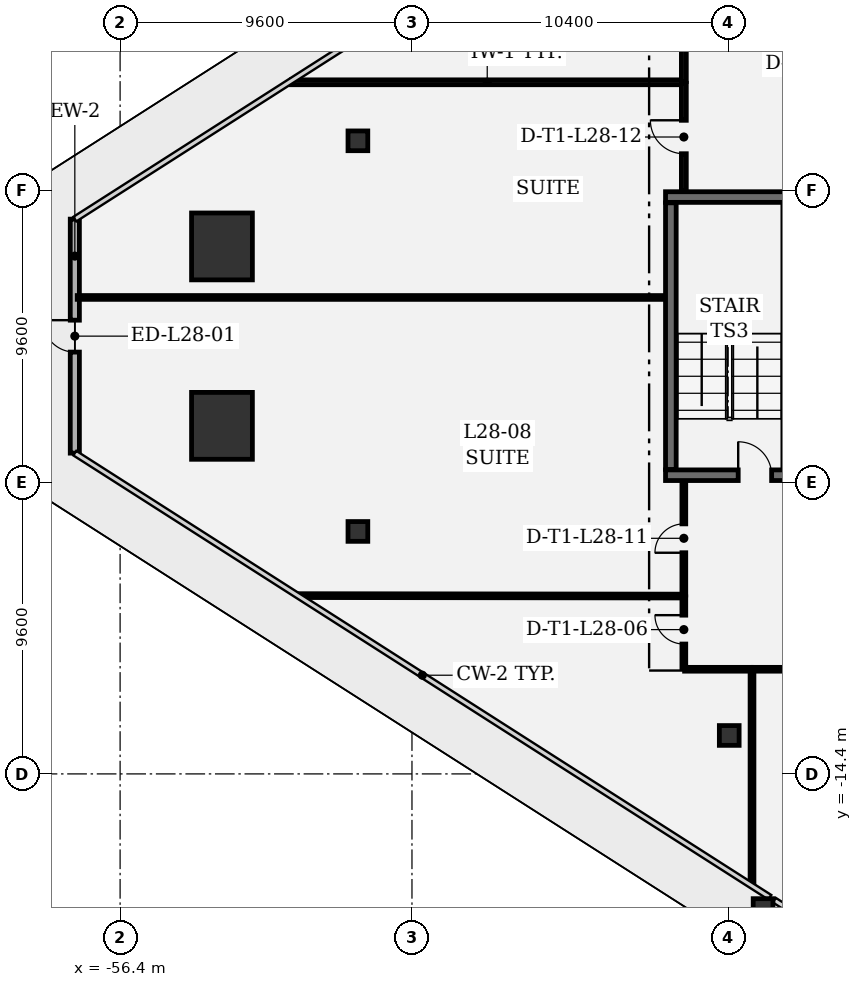
"""IFC4 building model, lengths in metres.
Left out: names, types, materials, properties, quantities, classifications, styles, units other than length and angle.
Written with IfcOpenShell. Run it as: python <this file> out.ifc"""

import sys

from ifc_helpers import new_model, si_unit, direction, frame, frame_2d, origin, origin_2d, place, context, subcontext, project, spatial, rectangle, extrude, element, fill, save


model = new_model("IFC4")
c1 = context("Model", 3, precision=1e-05, world=origin(), true_north=direction((0.0, 1.0)))
c2 = subcontext(c1, "Body", "Model", "MODEL_VIEW")
j1 = project(units=[si_unit("LENGTHUNIT", "METRE"), si_unit("PLANEANGLEUNIT", "RADIAN")], contexts=[c1])
p1 = place(None, origin())
s1 = spatial("IfcSite", under=j1, at=p1, CompositionType="ELEMENT")
p2 = place(p1, origin())
s2 = spatial("IfcBuilding", under=s1, at=p2, CompositionType="ELEMENT")
p3 = place(p2, frame((0.0, 0.0, 126.0)))
s3 = spatial("IfcBuildingStorey", under=s2, at=p3, CompositionType="ELEMENT", Elevation=126.0)
for number, where, z_axis, x_axis in (
    (1, (-53.049, 2.951, 0.0), (0.0, 0.0, 1.0), (1.0, 0.0, 0.0)),
    (2, (-53.049, -2.951, 0.0), (0.0, 0.0, 1.0), (1.0, 0.0, 0.0)),
):
    element("IfcColumn", number, at=place(p3, frame(where, z_axis=z_axis, x_axis=x_axis)), inside=s3, PredefinedType="COLUMN", context=c2, shape_type="SweptSolid", body=[
        extrude(rectangle(XDim=2.0, YDim=2.2, at=origin_2d()), origin(), (0.0, 0.0, 1.0), 4.05),
    ])
for number, where, z_axis, x_axis in (
    (3, (-35.252, -18.829, 0.0), (0.0, 0.0, 1.0), (1.0, 0.0, 0.0)),
    (4, (-48.578, 6.425, 0.0), (0.0, 0.0, 1.0), (1.0, 0.0, 0.0)),
    (5, (-48.578, -6.425, 0.0), (0.0, 0.0, 1.0), (1.0, 0.0, 0.0)),
    (6, (-36.365, -13.135, 0.0), (0.0, 0.0, 1.0), (1.0, 0.0, 0.0)),
):
    element("IfcColumn", number, at=place(p3, frame(where, z_axis=z_axis, x_axis=x_axis)), inside=s3, PredefinedType="COLUMN", context=c2, shape_type="SweptSolid", body=[
        extrude(rectangle(XDim=0.65, YDim=0.65, at=origin_2d()), origin(), (0.0, 0.0, 1.0), 4.05),
    ])
p4 = place(p3, frame((-57.889, -3.849, 0.0), z_axis=(0.0, 0.0, 1.0), x_axis=(0.0, 1.0, 0.0)))
e7 = element("IfcWall", 7, at=p4, inside=s3, PredefinedType="SOLIDWALL", context=c2, shape_type="SweptSolid", body=[
    extrude(rectangle(XDim=7.697, YDim=0.3, at=frame_2d((3.849, 0.0))), origin(), (0.0, 0.0, 1.0), 3.77),
])
p5 = place(p4, frame((3.323, 0.0, 0.0)))
e8 = element("IfcOpeningElement", 8, at=p5, cuts=e7, PredefinedType="OPENING", context=c2, shape_type="SweptSolid", body=[
    extrude(rectangle(XDim=1.05, YDim=2.2, at=frame_2d((0.525, 1.1))), frame((0.0, 0.16, 0.0), z_axis=(0.0, -1.0, 0.0), x_axis=(1.0, 0.0, 0.0)), (0.0, 0.0, 1.0), 0.32),
])
p6 = place(p3, frame((-38.46, -4.575, 0.0), z_axis=(0.0, 0.0, 1.0), x_axis=(1.0, 0.0, 0.0)))
e9 = element("IfcWall", 9, at=p6, inside=s3, PredefinedType="SHEAR", context=c2, shape_type="SweptSolid", body=[
    extrude(rectangle(XDim=4.21, YDim=0.35, at=frame_2d((2.105, 0.0))), origin(), (0.0, 0.0, 1.0), 3.77),
])
p7 = place(p6, frame((2.39, 0.0, 0.0)))
e10 = element("IfcOpeningElement", 10, at=p7, cuts=e9, PredefinedType="OPENING", context=c2, shape_type="SweptSolid", body=[
    extrude(rectangle(XDim=1.1, YDim=2.2, at=frame_2d((0.55, 1.1))), frame((0.0, 0.185, 0.0), z_axis=(0.0, -1.0, 0.0), x_axis=(1.0, 0.0, 0.0)), (0.0, 0.0, 1.0), 0.37),
])
p8 = place(p3, frame((-34.25, 4.575, 0.0), z_axis=(0.0, 0.0, 1.0), x_axis=(-1.0, 0.0, 0.0)))
e11 = element("IfcWall", 11, at=p8, inside=s3, PredefinedType="SHEAR", context=c2, shape_type="SweptSolid", body=[
    extrude(rectangle(XDim=4.21, YDim=0.35, at=frame_2d((2.105, 0.0))), origin(), (0.0, 0.0, 1.0), 3.77),
])
p9 = place(p3, frame((-38.285, 4.385, 0.0), z_axis=(0.0, 0.0, 1.0), x_axis=(0.0, -1.0, 0.0)))
e12 = element("IfcWall", 12, at=p9, inside=s3, PredefinedType="SHEAR", context=c2, shape_type="SweptSolid", body=[
    extrude(rectangle(XDim=8.77, YDim=0.35, at=frame_2d((4.385, 0.0))), origin(), (0.0, 0.0, 1.0), 3.77),
])
p10 = place(p3, frame((-50.766, 8.35, 0.0), z_axis=(0.0, 0.0, 1.0), x_axis=(1.0, 0.0, 0.0)))
e13 = element("IfcWall", 13, at=p10, inside=s3, PredefinedType="PARTITIONING", context=c2, shape_type="SweptSolid", body=[
    extrude(rectangle(XDim=12.883, YDim=0.16, at=frame_2d((6.442, 0.0))), origin(), (0.0, 0.0, 1.0), 2.89),
])
p11 = place(p3, frame((-37.858, 10.733, 0.0), z_axis=(0.0, 0.0, 1.0), x_axis=(0.0, -1.0, 0.0)))
e14 = element("IfcWall", 14, at=p11, inside=s3, PredefinedType="PARTITIONING", context=c2, shape_type="SweptSolid", body=[
    extrude(rectangle(XDim=2.358, YDim=0.16, at=frame_2d((1.179, 0.0))), origin(), (0.0, 0.0, 1.0), 3.77),
])
p12 = place(p3, frame((-35.64, -10.958, 0.0), z_axis=(0.0, 0.0, 1.0), x_axis=(-1.0, 0.0, 0.0)))
e15 = element("IfcWall", 15, at=p12, inside=s3, PredefinedType="PARTITIONING", context=c2, shape_type="SweptSolid", body=[
    extrude(rectangle(XDim=2.193, YDim=0.125, at=frame_2d((1.096, 0.0))), origin(), (0.0, 0.0, 1.0), 3.334),
])
p13 = place(p3, frame((-37.858, -10.933, 0.0), z_axis=(0.0, 0.0, 1.0), x_axis=(0.0, 1.0, 0.0)))
e16 = element("IfcWall", 16, at=p13, inside=s3, PredefinedType="PARTITIONING", context=c2, shape_type="SweptSolid", body=[
    extrude(rectangle(XDim=2.358, YDim=0.125, at=frame_2d((1.179, 0.0))), origin(), (0.0, 0.0, 1.0), 3.77),
])
p14 = place(p13, frame((0.805, 0.0, 0.0)))
e17 = element("IfcOpeningElement", 17, at=p14, cuts=e16, PredefinedType="OPENING", context=c2, shape_type="SweptSolid", body=[
    extrude(rectangle(XDim=0.95, YDim=2.15, at=frame_2d((0.475, 1.075))), frame((0.0, 0.073, 0.0), z_axis=(0.0, -1.0, 0.0), x_axis=(1.0, 0.0, 0.0)), (0.0, 0.0, 1.0), 0.145),
])
p15 = place(p3, frame((-37.883, -8.55, 0.0), z_axis=(0.0, 0.0, 1.0), x_axis=(-0.999999323514, 0.001163173127, 0.0)))
e18 = element("IfcWall", 18, at=p15, inside=s3, PredefinedType="PARTITIONING", context=c2, shape_type="SweptSolid", body=[
    extrude(rectangle(XDim=12.594, YDim=0.125, at=frame_2d((6.297, 0.0))), origin(), (0.0, 0.0, 1.0), 2.89),
])
p16 = place(p3, frame((-35.615, -18.004, 0.0), z_axis=(0.0, 0.0, 1.0), x_axis=(0.0, 1.0, 0.0)))
e19 = element("IfcWall", 19, at=p16, inside=s3, PredefinedType="PARTITIONING", context=c2, shape_type="SweptSolid", body=[
    extrude(rectangle(XDim=7.021, YDim=0.125, at=frame_2d((3.511, 0.0))), origin(), (0.0, 0.0, 1.0), 3.77),
])
p17 = place(p3, frame((-27.904, -10.958, 0.0), z_axis=(0.0, 0.0, 1.0), x_axis=(-1.0, 0.0, 0.0)))
e20 = element("IfcWall", 20, at=p17, inside=s3, PredefinedType="PARTITIONING", context=c2, shape_type="SweptSolid", body=[
    extrude(rectangle(XDim=7.679, YDim=0.125, at=frame_2d((3.839, 0.0))), origin(), (0.0, 0.0, 1.0), 3.334),
])
p18 = place(p17, frame((3.365, 0.0, 0.0)))
e21 = element("IfcOpeningElement", 21, at=p18, cuts=e20, PredefinedType="OPENING", context=c2, shape_type="SweptSolid", body=[
    extrude(rectangle(XDim=0.95, YDim=2.15, at=frame_2d((0.475, 1.075))), frame((0.0, 0.073, 0.0), z_axis=(0.0, -1.0, 0.0), x_axis=(1.0, 0.0, 0.0)), (0.0, 0.0, 1.0), 0.145),
])
p19 = place(p3, frame((-37.858, -8.517, 0.0), z_axis=(0.0, 0.0, 1.0), x_axis=(0.0, 1.0, 0.0)))
e22 = element("IfcWall", 22, at=p19, inside=s3, PredefinedType="PARTITIONING", context=c2, shape_type="SweptSolid", body=[
    extrude(rectangle(XDim=3.734, YDim=0.125, at=frame_2d((1.867, 0.0))), origin(), (0.0, 0.0, 1.0), 3.77),
])
p20 = place(p19, frame((1.392, 0.0, 0.0)))
e23 = element("IfcOpeningElement", 23, at=p20, cuts=e22, PredefinedType="OPENING", context=c2, shape_type="SweptSolid", body=[
    extrude(rectangle(XDim=0.95, YDim=2.15, at=frame_2d((0.475, 1.075))), frame((0.0, 0.073, 0.0), z_axis=(0.0, -1.0, 0.0), x_axis=(1.0, 0.0, 0.0)), (0.0, 0.0, 1.0), 0.145),
])
p21 = place(p3, frame((-38.493, 1.271, 0.0), z_axis=(0.0, 0.0, 1.0), x_axis=(-0.999999998722, 5.0556756e-05, 0.0)))
e24 = element("IfcWall", 24, at=p21, inside=s3, PredefinedType="PARTITIONING", context=c2, shape_type="SweptSolid", body=[
    extrude(rectangle(XDim=19.316, YDim=0.125, at=frame_2d((9.658, 0.0))), origin(), (0.0, 0.0, 1.0), 3.77),
])
p22 = place(p3, frame((-37.858, 4.783, 0.0), z_axis=(0.0, 0.0, 1.0), x_axis=(0.0, 1.0, 0.0)))
e25 = element("IfcWall", 25, at=p22, inside=s3, PredefinedType="PARTITIONING", context=c2, shape_type="SweptSolid", body=[
    extrude(rectangle(XDim=3.534, YDim=0.16, at=frame_2d((1.767, 0.0))), origin(), (0.0, 0.0, 1.0), 3.77),
])
p23 = place(p22, frame((1.217, 0.0, 0.0)))
e26 = element("IfcOpeningElement", 26, at=p23, cuts=e25, PredefinedType="OPENING", context=c2, shape_type="SweptSolid", body=[
    extrude(rectangle(XDim=1.1, YDim=2.15, at=frame_2d((0.55, 1.075))), frame((0.0, 0.09, 0.0), z_axis=(0.0, -1.0, 0.0), x_axis=(1.0, 0.0, 0.0)), (0.0, 0.0, 1.0), 0.18),
])
p24 = place(p5, origin())
e27 = element("IfcDoor", 27, at=p24, inside=s3, OperationType="SINGLE_SWING_RIGHT", PredefinedType="DOOR", context=c2, shape_type="SweptSolid", body=[
    extrude(rectangle(XDim=1.05, YDim=2.2, at=frame_2d((0.525, 1.1))), frame((0.0, 0.025, 0.0), z_axis=(0.0, -1.0, 0.0), x_axis=(1.0, 0.0, 0.0)), (0.0, 0.0, 1.0), 0.05),
])
fill(e8, e27)
p25 = place(p7, origin())
e28 = element("IfcDoor", 28, at=p25, inside=s3, OperationType="SINGLE_SWING_LEFT", PredefinedType="DOOR", context=c2, shape_type="SweptSolid", body=[
    extrude(rectangle(XDim=1.1, YDim=2.2, at=frame_2d((0.55, 1.1))), frame((0.0, 0.025, 0.0), z_axis=(0.0, -1.0, 0.0), x_axis=(1.0, 0.0, 0.0)), (0.0, 0.0, 1.0), 0.05),
])
fill(e10, e28)
p26 = place(p14, origin())
e29 = element("IfcDoor", 29, at=p26, inside=s3, OperationType="SINGLE_SWING_RIGHT", PredefinedType="DOOR", context=c2, shape_type="SweptSolid", body=[
    extrude(rectangle(XDim=0.95, YDim=2.15, at=frame_2d((0.475, 1.075))), frame((0.0, 0.025, 0.0), z_axis=(0.0, -1.0, 0.0), x_axis=(1.0, 0.0, 0.0)), (0.0, 0.0, 1.0), 0.05),
])
fill(e17, e29)
p27 = place(p20, origin())
e30 = element("IfcDoor", 30, at=p27, inside=s3, OperationType="SINGLE_SWING_LEFT", PredefinedType="DOOR", context=c2, shape_type="SweptSolid", body=[
    extrude(rectangle(XDim=0.95, YDim=2.15, at=frame_2d((0.475, 1.075))), frame((0.0, 0.025, 0.0), z_axis=(0.0, -1.0, 0.0), x_axis=(1.0, 0.0, 0.0)), (0.0, 0.0, 1.0), 0.05),
])
fill(e23, e30)
p28 = place(p23, origin())
e31 = element("IfcDoor", 31, at=p28, inside=s3, OperationType="SINGLE_SWING_RIGHT", PredefinedType="DOOR", context=c2, shape_type="SweptSolid", body=[
    extrude(rectangle(XDim=1.1, YDim=2.15, at=frame_2d((0.55, 1.075))), frame((0.0, 0.025, 0.0), z_axis=(0.0, -1.0, 0.0), x_axis=(1.0, 0.0, 0.0)), (0.0, 0.0, 1.0), 0.05),
])
fill(e26, e31)
save(model, sys.argv[1])
